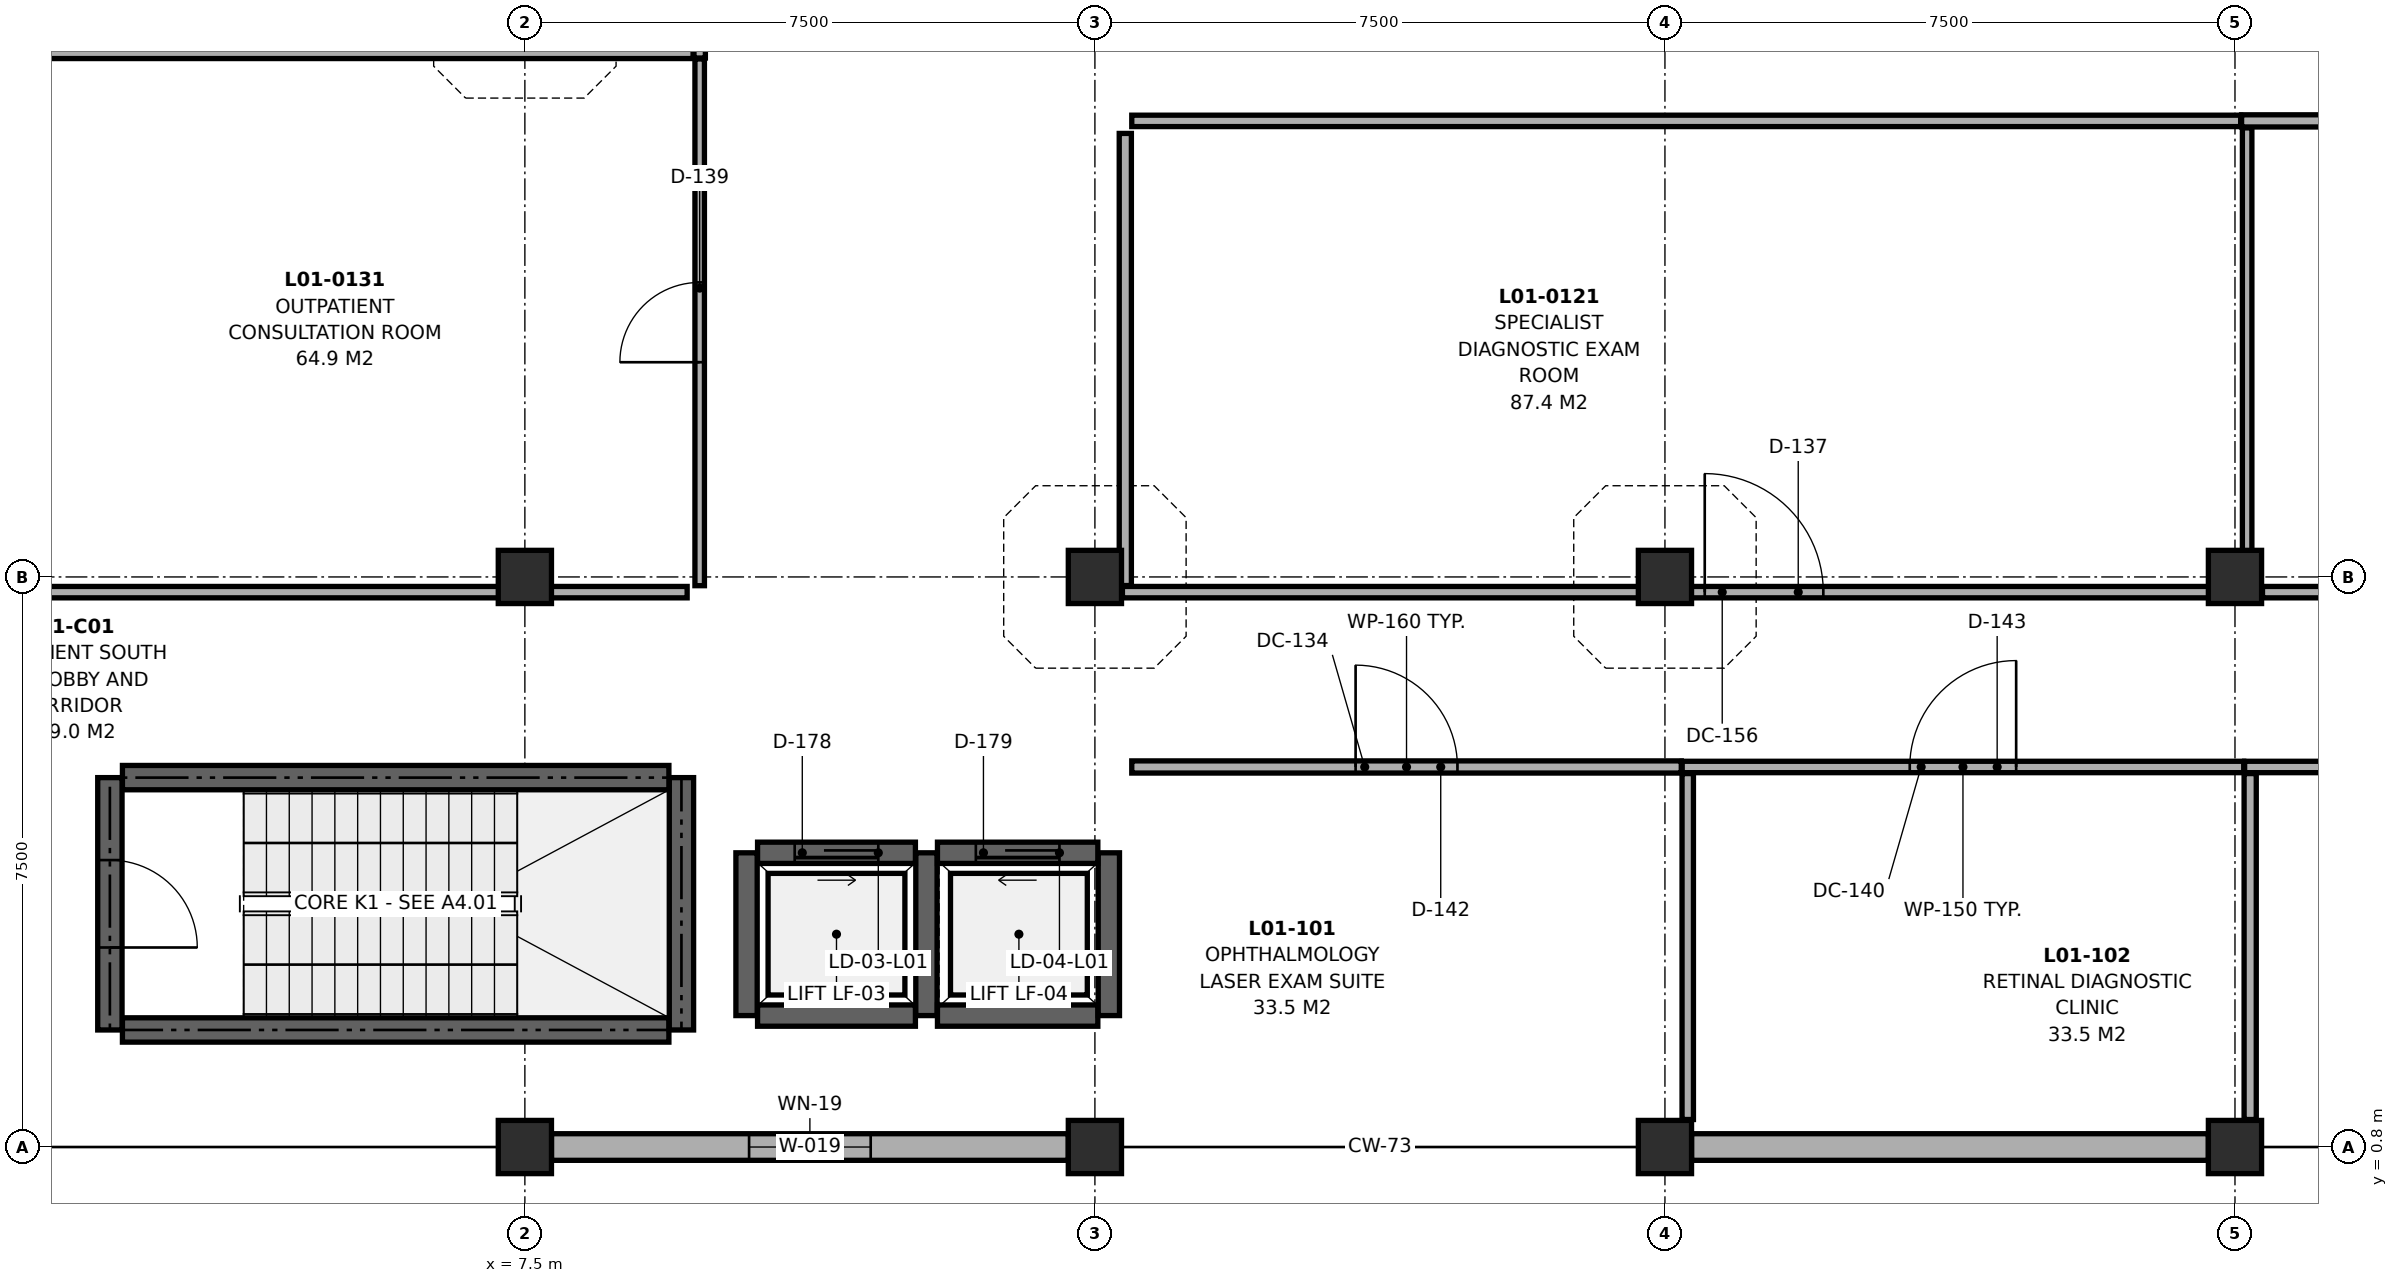
"""IFC4 building model, lengths in metres.
Left out: names, types, materials, properties, quantities, classifications, styles, units other than length and angle.
Written with IfcOpenShell. Run it as: python <this file> out.ifc"""

import sys

from ifc_helpers import new_model, si_unit, direction, frame, frame_2d, origin, origin_2d, place, context, subcontext, project, spatial, rectangle, extrude, element, fill, save


model = new_model("IFC4")
c1 = context("Model", 3, precision=1e-05, world=origin(), true_north=direction((0.0, 1.0)))
c2 = subcontext(c1, "Body", "Model", "MODEL_VIEW")
j1 = project(units=[si_unit("LENGTHUNIT", "METRE"), si_unit("PLANEANGLEUNIT", "RADIAN")], contexts=[c1])
p1 = place(None, origin())
s1 = spatial("IfcSite", under=j1, at=p1, CompositionType="ELEMENT")
p2 = place(p1, origin())
s2 = spatial("IfcBuilding", under=s1, at=p2, CompositionType="ELEMENT")
p3 = place(p2, frame((0.0, 0.0, 5.0)))
s3 = spatial("IfcBuildingStorey", under=s2, at=p3, CompositionType="ELEMENT", Elevation=5.0)
for number, where, z_axis, x_axis in (
    (1, (7.5, 0.8, 0.0), (0.0, 0.0, 1.0), (1.0, 0.0, 0.0)),
    (2, (7.5, 8.3, 0.0), (0.0, 0.0, 1.0), (1.0, 0.0, 0.0)),
    (3, (15.0, 0.8, 0.0), (0.0, 0.0, 1.0), (1.0, 0.0, 0.0)),
    (4, (15.0, 8.3, 0.0), (0.0, 0.0, 1.0), (1.0, 0.0, 0.0)),
    (5, (22.5, 0.8, 0.0), (0.0, 0.0, 1.0), (1.0, 0.0, 0.0)),
    (6, (22.5, 8.3, 0.0), (0.0, 0.0, 1.0), (1.0, 0.0, 0.0)),
    (7, (30.0, 0.8, 0.0), (0.0, 0.0, 1.0), (1.0, 0.0, 0.0)),
    (8, (30.0, 8.3, 0.0), (0.0, 0.0, 1.0), (1.0, 0.0, 0.0)),
):
    element("IfcColumn", number, at=place(p3, frame(where, z_axis=z_axis, x_axis=x_axis)), inside=s3, PredefinedType="COLUMN", context=c2, shape_type="SweptSolid", body=[
        extrude(rectangle(XDim=0.7, YDim=0.7, at=origin_2d()), origin(), (0.0, 0.0, 1.0), 4.2),
    ])
p4 = place(p3, frame((29.65, 0.8, 0.0), z_axis=(0.0, 0.0, 1.0), x_axis=(-1.0, 0.0, 0.0)))
e9 = element("IfcWall", 9, at=p4, inside=s3, PredefinedType="SOLIDWALL", context=c2, shape_type="SweptSolid", body=[
    extrude(rectangle(XDim=6.8, YDim=0.35, at=frame_2d((3.4, 0.0))), origin(), (0.0, 0.0, 1.0), 3.535),
])
p5 = place(p3, frame((14.65, 0.8, 0.0), z_axis=(0.0, 0.0, 1.0), x_axis=(-1.0, 0.0, 0.0)))
e10 = element("IfcWall", 10, at=p5, inside=s3, PredefinedType="SOLIDWALL", context=c2, shape_type="SweptSolid", body=[
    extrude(rectangle(XDim=6.8, YDim=0.35, at=frame_2d((3.4, 0.0))), origin(), (0.0, 0.0, 1.0), 3.535),
])
p6 = place(p5, frame((2.6, 0.0, 0.9)))
e11 = element("IfcOpeningElement", 11, at=p6, cuts=e10, PredefinedType="OPENING", context=c2, shape_type="SweptSolid", body=[
    extrude(rectangle(XDim=1.6, YDim=1.7, at=frame_2d((0.8, 0.85))), frame((0.0, 0.187, 0.0), z_axis=(0.0, -1.0, 0.0), x_axis=(1.0, 0.0, 0.0)), (0.0, 0.0, 1.0), 0.374),
])
p7 = place(p3, frame((2.205, 2.34, 0.0), z_axis=(0.0, 0.0, 1.0), x_axis=(1.0, 0.0, 0.0)))
e12 = element("IfcWall", 12, at=p7, inside=s3, PredefinedType="SHEAR", context=c2, shape_type="SweptSolid", body=[
    extrude(rectangle(XDim=7.19, YDim=0.32, at=frame_2d((3.595, 0.0))), origin(), (0.0, 0.0, 1.0), 4.2),
])
p8 = place(p3, frame((9.56, 2.34, 0.0), z_axis=(0.0, 0.0, 1.0), x_axis=(0.0, 1.0, 0.0)))
e13 = element("IfcWall", 13, at=p8, inside=s3, PredefinedType="SHEAR", context=c2, shape_type="SweptSolid", body=[
    extrude(rectangle(XDim=3.32, YDim=0.32, at=frame_2d((1.66, 0.0))), origin(), (0.0, 0.0, 1.0), 4.2),
])
p9 = place(p3, frame((9.395, 5.66, 0.0), z_axis=(0.0, 0.0, 1.0), x_axis=(-1.0, 0.0, 0.0)))
e14 = element("IfcWall", 14, at=p9, inside=s3, PredefinedType="SHEAR", context=c2, shape_type="SweptSolid", body=[
    extrude(rectangle(XDim=7.19, YDim=0.32, at=frame_2d((3.595, 0.0))), origin(), (0.0, 0.0, 1.0), 4.2),
])
p10 = place(p3, frame((2.04, 5.66, 0.0), z_axis=(0.0, 0.0, 1.0), x_axis=(0.0, -1.0, 0.0)))
e15 = element("IfcWall", 15, at=p10, inside=s3, PredefinedType="SHEAR", context=c2, shape_type="SweptSolid", body=[
    extrude(rectangle(XDim=3.32, YDim=0.32, at=frame_2d((1.66, 0.0))), origin(), (0.0, 0.0, 1.0), 4.2),
])
p11 = place(p10, frame((1.085, 0.0, 0.0)))
e16 = element("IfcOpeningElement", 16, at=p11, cuts=e15, PredefinedType="OPENING", context=c2, shape_type="SweptSolid", body=[
    extrude(rectangle(XDim=1.15, YDim=2.15, at=frame_2d((0.575, 1.075))), frame((0.0, 0.172, 0.0), z_axis=(0.0, -1.0, 0.0), x_axis=(1.0, 0.0, 0.0)), (0.0, 0.0, 1.0), 0.344),
])
p12 = place(p3, frame((10.562, 2.529, 0.0), z_axis=(0.0, 0.0, 1.0), x_axis=(1.0, 0.0, 0.0)))
e17 = element("IfcWall", 17, at=p12, inside=s3, PredefinedType="SHEAR", context=c2, shape_type="SweptSolid", body=[
    extrude(rectangle(XDim=2.077, YDim=0.28, at=frame_2d((1.039, 0.0))), origin(), (0.0, 0.0, 1.0), 4.2),
])
p13 = place(p3, frame((12.783, 2.529, 0.0), z_axis=(0.0, 0.0, 1.0), x_axis=(0.0, 1.0, 0.0)))
e18 = element("IfcWall", 18, at=p13, inside=s3, PredefinedType="SHEAR", context=c2, shape_type="SweptSolid", body=[
    extrude(rectangle(XDim=2.141, YDim=0.28, at=frame_2d((1.071, 0.0))), origin(), (0.0, 0.0, 1.0), 4.2),
])
p14 = place(p3, frame((12.638, 4.671, 0.0), z_axis=(0.0, 0.0, 1.0), x_axis=(-1.0, 0.0, 0.0)))
e19 = element("IfcWall", 19, at=p14, inside=s3, PredefinedType="SHEAR", context=c2, shape_type="SweptSolid", body=[
    extrude(rectangle(XDim=2.077, YDim=0.28, at=frame_2d((1.039, 0.0))), origin(), (0.0, 0.0, 1.0), 4.2),
])
p15 = place(p14, frame((0.489, 0.0, 0.0)))
e20 = element("IfcOpeningElement", 20, at=p15, cuts=e19, PredefinedType="OPENING", context=c2, shape_type="SweptSolid", body=[
    extrude(rectangle(XDim=1.1, YDim=2.15, at=frame_2d((0.55, 1.075))), frame((0.0, 0.152, 0.0), z_axis=(0.0, -1.0, 0.0), x_axis=(1.0, 0.0, 0.0)), (0.0, 0.0, 1.0), 0.304),
])
p16 = place(p3, frame((10.417, 4.671, 0.0), z_axis=(0.0, 0.0, 1.0), x_axis=(0.0, -1.0, 0.0)))
e21 = element("IfcWall", 21, at=p16, inside=s3, PredefinedType="SHEAR", context=c2, shape_type="SweptSolid", body=[
    extrude(rectangle(XDim=2.141, YDim=0.28, at=frame_2d((1.071, 0.0))), origin(), (0.0, 0.0, 1.0), 4.2),
])
p17 = place(p3, frame((12.928, 2.529, 0.0), z_axis=(0.0, 0.0, 1.0), x_axis=(1.0, 0.0, 0.0)))
e22 = element("IfcWall", 22, at=p17, inside=s3, PredefinedType="SHEAR", context=c2, shape_type="SweptSolid", body=[
    extrude(rectangle(XDim=2.11, YDim=0.28, at=frame_2d((1.055, 0.0))), origin(), (0.0, 0.0, 1.0), 4.2),
])
p18 = place(p3, frame((15.184, 2.529, 0.0), z_axis=(0.0, 0.0, 1.0), x_axis=(0.0, 1.0, 0.0)))
e23 = element("IfcWall", 23, at=p18, inside=s3, PredefinedType="SHEAR", context=c2, shape_type="SweptSolid", body=[
    extrude(rectangle(XDim=2.141, YDim=0.28, at=frame_2d((1.071, 0.0))), origin(), (0.0, 0.0, 1.0), 4.2),
])
p19 = place(p3, frame((15.039, 4.671, 0.0), z_axis=(0.0, 0.0, 1.0), x_axis=(-1.0, 0.0, 0.0)))
e24 = element("IfcWall", 24, at=p19, inside=s3, PredefinedType="SHEAR", context=c2, shape_type="SweptSolid", body=[
    extrude(rectangle(XDim=2.11, YDim=0.28, at=frame_2d((1.055, 0.0))), origin(), (0.0, 0.0, 1.0), 4.2),
])
p20 = place(p19, frame((0.505, 0.0, 0.0)))
e25 = element("IfcOpeningElement", 25, at=p20, cuts=e24, PredefinedType="OPENING", context=c2, shape_type="SweptSolid", body=[
    extrude(rectangle(XDim=1.1, YDim=2.15, at=frame_2d((0.55, 1.075))), frame((0.0, 0.152, 0.0), z_axis=(0.0, -1.0, 0.0), x_axis=(1.0, 0.0, 0.0)), (0.0, 0.0, 1.0), 0.304),
])
p21 = place(p3, frame((15.485, 5.8, 0.0), z_axis=(0.0, 0.0, 1.0), x_axis=(1.0, 0.0, 0.0)))
e26 = element("IfcWall", 26, at=p21, inside=s3, PredefinedType="PARTITIONING", context=c2, shape_type="SweptSolid", body=[
    extrude(rectangle(XDim=7.23, YDim=0.16, at=frame_2d((3.615, 0.0))), origin(), (0.0, 0.0, 1.0), 3.265),
])
p22 = place(p21, frame((2.945, 0.0, 0.0)))
e27 = element("IfcOpeningElement", 27, at=p22, cuts=e26, PredefinedType="OPENING", context=c2, shape_type="SweptSolid", body=[
    extrude(rectangle(XDim=1.34, YDim=2.24, at=frame_2d((0.67, 1.12))), frame((0.0, 0.092, 0.0), z_axis=(0.0, -1.0, 0.0), x_axis=(1.0, 0.0, 0.0)), (0.0, 0.0, 1.0), 0.184),
])
p23 = place(p3, frame((22.727, 5.8, 0.0), z_axis=(0.0, 0.0, 1.0), x_axis=(1.0, 0.0, 0.0)))
e28 = element("IfcWall", 28, at=p23, inside=s3, PredefinedType="PARTITIONING", context=c2, shape_type="SweptSolid", body=[
    extrude(rectangle(XDim=7.388, YDim=0.15, at=frame_2d((3.694, 0.0))), origin(), (0.0, 0.0, 1.0), 3.265),
])
p24 = place(p23, frame((2.994, 0.0, 0.0)))
e29 = element("IfcOpeningElement", 29, at=p24, cuts=e28, PredefinedType="OPENING", context=c2, shape_type="SweptSolid", body=[
    extrude(rectangle(XDim=1.4, YDim=2.25, at=frame_2d((0.7, 1.125))), frame((0.0, 0.087, 0.0), z_axis=(0.0, -1.0, 0.0), x_axis=(1.0, 0.0, 0.0)), (0.0, 0.0, 1.0), 0.174),
])
p25 = place(p3, frame((30.127, 5.8, 0.0), z_axis=(0.0, 0.0, 1.0), x_axis=(1.0, 0.0, 0.0)))
e30 = element("IfcWall", 30, at=p25, inside=s3, PredefinedType="PARTITIONING", context=c2, shape_type="SweptSolid", body=[
    extrude(rectangle(XDim=8.988, YDim=0.15, at=frame_2d((4.494, 0.0))), origin(), (0.0, 0.0, 1.0), 3.485),
])
p26 = place(p25, frame((3.769, 0.0, 0.0)))
e31 = element("IfcOpeningElement", 31, at=p26, cuts=e30, PredefinedType="OPENING", context=c2, shape_type="SweptSolid", body=[
    extrude(rectangle(XDim=1.45, YDim=2.26, at=frame_2d((0.725, 1.13))), frame((0.0, 0.087, 0.0), z_axis=(0.0, -1.0, 0.0), x_axis=(1.0, 0.0, 0.0)), (0.0, 0.0, 1.0), 0.174),
])
p27 = place(p3, frame((15.362, 8.1, 0.0), z_axis=(0.0, 0.0, 1.0), x_axis=(1.0, 0.0, 0.0)))
e32 = element("IfcWall", 32, at=p27, inside=s3, PredefinedType="PARTITIONING", context=c2, shape_type="SweptSolid", body=[
    extrude(rectangle(XDim=14.546, YDim=0.15, at=frame_2d((7.273, 0.0))), origin(), (0.0, 0.0, 1.0), 3.265),
])
p28 = place(p27, frame((7.662, 0.0, 0.0)))
e33 = element("IfcOpeningElement", 33, at=p28, cuts=e32, PredefinedType="OPENING", context=c2, shape_type="SweptSolid", body=[
    extrude(rectangle(XDim=1.56, YDim=2.3, at=frame_2d((0.78, 1.15))), frame((0.0, 0.087, 0.0), z_axis=(0.0, -1.0, 0.0), x_axis=(1.0, 0.0, 0.0)), (0.0, 0.0, 1.0), 0.174),
])
p29 = place(p3, frame((30.362, 8.1, 0.0), z_axis=(0.0, 0.0, 1.0), x_axis=(1.0, 0.0, 0.0)))
e34 = element("IfcWall", 34, at=p29, inside=s3, PredefinedType="PARTITIONING", context=c2, shape_type="SweptSolid", body=[
    extrude(rectangle(XDim=14.326, YDim=0.15, at=frame_2d((7.163, 0.0))), origin(), (0.0, 0.0, 1.0), 3.485),
])
p30 = place(p29, frame((7.859, 0.0, 0.0)))
e35 = element("IfcOpeningElement", 35, at=p30, cuts=e34, PredefinedType="OPENING", context=c2, shape_type="SweptSolid", body=[
    extrude(rectangle(XDim=1.65, YDim=2.32, at=frame_2d((0.825, 1.16))), frame((0.0, 0.087, 0.0), z_axis=(0.0, -1.0, 0.0), x_axis=(1.0, 0.0, 0.0)), (0.0, 0.0, 1.0), 0.174),
])
p31 = place(p3, frame((9.8, 8.185, 0.0), z_axis=(0.0, 0.0, 1.0), x_axis=(0.0, 1.0, 0.0)))
e36 = element("IfcWall", 36, at=p31, inside=s3, PredefinedType="PARTITIONING", context=c2, shape_type="SweptSolid", body=[
    extrude(rectangle(XDim=6.93, YDim=0.125, at=frame_2d((3.465, 0.0))), origin(), (0.0, 0.0, 1.0), 3.265),
])
p32 = place(p31, frame((2.94, 0.0, 0.0)))
e37 = element("IfcOpeningElement", 37, at=p32, cuts=e36, PredefinedType="OPENING", context=c2, shape_type="SweptSolid", body=[
    extrude(rectangle(XDim=1.05, YDim=2.15, at=frame_2d((0.525, 1.075))), frame((0.0, 0.074, 0.0), z_axis=(0.0, -1.0, 0.0), x_axis=(1.0, 0.0, 0.0)), (0.0, 0.0, 1.0), 0.149),
])
p33 = place(p3, frame((9.8, 15.127, 0.0), z_axis=(0.0, 0.0, 1.0), x_axis=(0.0, 1.0, 0.0)))
e38 = element("IfcWall", 38, at=p33, inside=s3, PredefinedType="PARTITIONING", context=c2, shape_type="SweptSolid", body=[
    extrude(rectangle(XDim=7.188, YDim=0.15, at=frame_2d((3.594, 0.0))), origin(), (0.0, 0.0, 1.0), 3.265),
])
p34 = place(p33, frame((2.994, 0.0, 0.0)))
e39 = element("IfcOpeningElement", 39, at=p34, cuts=e38, PredefinedType="OPENING", context=c2, shape_type="SweptSolid", body=[
    extrude(rectangle(XDim=1.2, YDim=2.15, at=frame_2d((0.6, 1.075))), frame((0.0, 0.087, 0.0), z_axis=(0.0, -1.0, 0.0), x_axis=(1.0, 0.0, 0.0)), (0.0, 0.0, 1.0), 0.174),
])
p35 = place(p3, frame((15.485, 14.3, 0.0), z_axis=(0.0, 0.0, 1.0), x_axis=(1.0, 0.0, 0.0)))
e40 = element("IfcWall", 40, at=p35, inside=s3, PredefinedType="PARTITIONING", context=c2, shape_type="SweptSolid", body=[
    extrude(rectangle(XDim=14.59, YDim=0.15, at=frame_2d((7.295, 0.0))), origin(), (0.0, 0.0, 1.0), 3.265),
])
p36 = place(p3, frame((30.087, 14.3, 0.0), z_axis=(0.0, 0.0, 1.0), x_axis=(1.0, 0.0, 0.0)))
e41 = element("IfcWall", 41, at=p36, inside=s3, PredefinedType="PARTITIONING", context=c2, shape_type="SweptSolid", body=[
    extrude(rectangle(XDim=14.726, YDim=0.16, at=frame_2d((7.363, 0.0))), origin(), (0.0, 0.0, 1.0), 3.485),
])
p37 = place(p3, frame((22.8, 1.162, 0.0), z_axis=(0.0, 0.0, 1.0), x_axis=(0.0, 1.0, 0.0)))
e42 = element("IfcWall", 42, at=p37, inside=s3, PredefinedType="PARTITIONING", context=c2, shape_type="SweptSolid", body=[
    extrude(rectangle(XDim=4.551, YDim=0.15, at=frame_2d((2.275, 0.0))), origin(), (0.0, 0.0, 1.0), 3.265),
])
p38 = place(p3, frame((30.2, 1.162, 0.0), z_axis=(0.0, 0.0, 1.0), x_axis=(0.0, 1.0, 0.0)))
e43 = element("IfcWall", 43, at=p38, inside=s3, PredefinedType="PARTITIONING", context=c2, shape_type="SweptSolid", body=[
    extrude(rectangle(XDim=4.551, YDim=0.16, at=frame_2d((2.275, 0.0))), origin(), (0.0, 0.0, 1.0), 3.485),
])
p39 = place(p3, frame((15.4, 8.187, 0.0), z_axis=(0.0, 0.0, 1.0), x_axis=(0.0, 1.0, 0.0)))
e44 = element("IfcWall", 44, at=p39, inside=s3, PredefinedType="PARTITIONING", context=c2, shape_type="SweptSolid", body=[
    extrude(rectangle(XDim=5.948, YDim=0.16, at=frame_2d((2.974, 0.0))), origin(), (0.0, 0.0, 1.0), 3.265),
])
p40 = place(p3, frame((30.16, 8.432, 0.0), z_axis=(0.0, 0.0, 1.0), x_axis=(0.0, 1.0, 0.0)))
e45 = element("IfcWall", 45, at=p40, inside=s3, PredefinedType="PARTITIONING", context=c2, shape_type="SweptSolid", body=[
    extrude(rectangle(XDim=5.776, YDim=0.125, at=frame_2d((2.888, 0.0))), origin(), (0.0, 0.0, 1.0), 3.485),
])
p41 = place(p3, frame((0.362, 8.1, 0.0), z_axis=(0.0, 0.0, 1.0), x_axis=(1.0, 0.0, 0.0)))
e46 = element("IfcWall", 46, at=p41, inside=s3, PredefinedType="PARTITIONING", context=c2, shape_type="SweptSolid", body=[
    extrude(rectangle(XDim=9.273, YDim=0.15, at=frame_2d((4.636, 0.0))), origin(), (0.0, 0.0, 1.0), 3.265),
])
p42 = place(p3, frame((0.102, 15.2, 0.0), z_axis=(0.0, 0.0, 1.0), x_axis=(1.0, 0.0, 0.0)))
e47 = element("IfcWall", 47, at=p42, inside=s3, PredefinedType="PARTITIONING", context=c2, shape_type="SweptSolid", body=[
    extrude(rectangle(XDim=9.611, YDim=0.16, at=frame_2d((4.805, 0.0))), origin(), (0.0, 0.0, 1.0), 3.265),
])
p43 = place(p6, origin())
e48 = element("IfcWindow", 48, at=p43, inside=s3, PartitioningType="DOUBLE_PANEL_VERTICAL", PredefinedType="WINDOW", context=c2, shape_type="SweptSolid", body=[
    extrude(rectangle(XDim=1.6, YDim=1.7, at=frame_2d((0.8, 0.85))), frame((0.0, 0.03, 0.0), z_axis=(0.0, -1.0, 0.0), x_axis=(1.0, 0.0, 0.0)), (0.0, 0.0, 1.0), 0.06),
])
fill(e11, e48)
p44 = place(p11, origin())
e49 = element("IfcDoor", 49, at=p44, inside=s3, OperationType="SINGLE_SWING_RIGHT", PredefinedType="DOOR", context=c2, shape_type="SweptSolid", body=[
    extrude(rectangle(XDim=1.15, YDim=2.15, at=frame_2d((0.575, 1.075))), frame((0.0, 0.025, 0.0), z_axis=(0.0, -1.0, 0.0), x_axis=(1.0, 0.0, 0.0)), (0.0, 0.0, 1.0), 0.05),
])
fill(e16, e49)
p45 = place(p15, origin())
e50 = element("IfcDoor", 50, at=p45, inside=s3, OperationType="SLIDING_TO_LEFT", PredefinedType="DOOR", context=c2, shape_type="SweptSolid", body=[
    extrude(rectangle(XDim=1.1, YDim=2.15, at=frame_2d((0.55, 1.075))), frame((0.0, 0.025, 0.0), z_axis=(0.0, -1.0, 0.0), x_axis=(1.0, 0.0, 0.0)), (0.0, 0.0, 1.0), 0.05),
])
fill(e20, e50)
p46 = place(p20, origin())
e51 = element("IfcDoor", 51, at=p46, inside=s3, OperationType="SLIDING_TO_RIGHT", PredefinedType="DOOR", context=c2, shape_type="SweptSolid", body=[
    extrude(rectangle(XDim=1.1, YDim=2.15, at=frame_2d((0.55, 1.075))), frame((0.0, 0.025, 0.0), z_axis=(0.0, -1.0, 0.0), x_axis=(1.0, 0.0, 0.0)), (0.0, 0.0, 1.0), 0.05),
])
fill(e25, e51)
p47 = place(p22, origin())
e52 = element("IfcDoor", 52, at=p47, inside=s3, OperationType="SINGLE_SWING_LEFT", PredefinedType="DOOR", context=c2, shape_type="SweptSolid", body=[
    extrude(rectangle(XDim=1.34, YDim=2.24, at=frame_2d((0.67, 1.12))), frame((0.0, 0.025, 0.0), z_axis=(0.0, -1.0, 0.0), x_axis=(1.0, 0.0, 0.0)), (0.0, 0.0, 1.0), 0.05),
])
fill(e27, e52)
p48 = place(p24, origin())
e53 = element("IfcDoor", 53, at=p48, inside=s3, OperationType="SINGLE_SWING_RIGHT", PredefinedType="DOOR", context=c2, shape_type="SweptSolid", body=[
    extrude(rectangle(XDim=1.4, YDim=2.25, at=frame_2d((0.7, 1.125))), frame((0.0, 0.025, 0.0), z_axis=(0.0, -1.0, 0.0), x_axis=(1.0, 0.0, 0.0)), (0.0, 0.0, 1.0), 0.05),
])
fill(e29, e53)
p49 = place(p28, origin())
e54 = element("IfcDoor", 54, at=p49, inside=s3, OperationType="SINGLE_SWING_LEFT", PredefinedType="DOOR", context=c2, shape_type="SweptSolid", body=[
    extrude(rectangle(XDim=1.56, YDim=2.3, at=frame_2d((0.78, 1.15))), frame((0.0, 0.025, 0.0), z_axis=(0.0, -1.0, 0.0), x_axis=(1.0, 0.0, 0.0)), (0.0, 0.0, 1.0), 0.05),
])
fill(e33, e54)
p50 = place(p32, origin())
e55 = element("IfcDoor", 55, at=p50, inside=s3, OperationType="SINGLE_SWING_LEFT", PredefinedType="DOOR", context=c2, shape_type="SweptSolid", body=[
    extrude(rectangle(XDim=1.05, YDim=2.15, at=frame_2d((0.525, 1.075))), frame((0.0, 0.025, 0.0), z_axis=(0.0, -1.0, 0.0), x_axis=(1.0, 0.0, 0.0)), (0.0, 0.0, 1.0), 0.05),
])
fill(e37, e55)
save(model, sys.argv[1])
